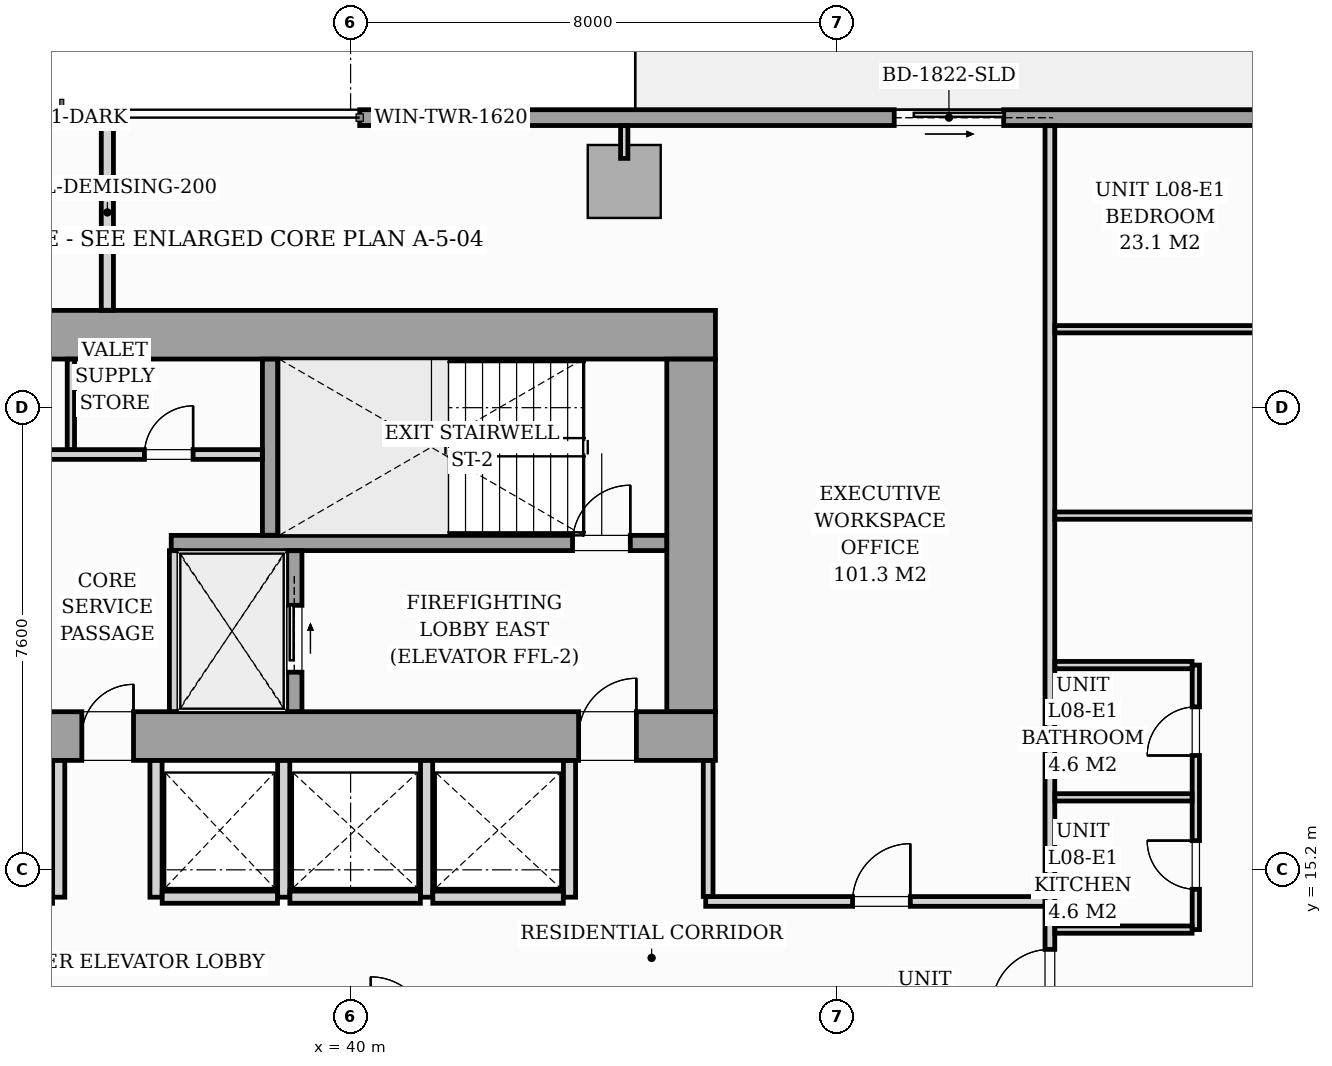
"""IFC4 building model, lengths in metres.
Left out: names, types, materials, properties, quantities, classifications, styles, units other than length and angle.
Written with IfcOpenShell. Run it as: python <this file> out.ifc"""

import sys

from ifc_helpers import new_model, si_unit, direction, frame, frame_2d, origin, origin_2d, place, context, subcontext, project, spatial, rectangle, i_section, extrude, source, transform, mapped, element, fill, save


model = new_model("IFC4")
c1 = context("Model", 3, precision=1e-05, world=origin(), true_north=direction((0.0, 1.0)))
c2 = subcontext(c1, "Body", "Model", "MODEL_VIEW")
j1 = project(units=[si_unit("LENGTHUNIT", "METRE"), si_unit("PLANEANGLEUNIT", "RADIAN")], contexts=[c1])
p1 = place(None, origin())
s1 = spatial("IfcSite", under=j1, at=p1, CompositionType="ELEMENT")
p2 = place(p1, origin())
s2 = spatial("IfcBuilding", under=s1, at=p2, CompositionType="ELEMENT")
p3 = place(p2, frame((0.0, 0.0, 32.6)))
s3 = spatial("IfcBuildingStorey", under=s2, at=p3, CompositionType="ELEMENT", Elevation=32.6)
m1 = source(origin(), c2, "Body", "SweptSolid", [
    extrude(i_section(OverallWidth=0.437, OverallDepth=0.514, WebThickness=0.061, FlangeThickness=0.097, FilletRadius=0.018, at=origin_2d()), origin(), (0.0, 0.0, 1.0), 3.196),
])
for number, where, z_axis, x_axis in (
    (1, (38.88, 17.4, 0.002), (0.0, 0.0, 1.0), (1.0, 0.0, 0.0)),
    (2, (45.6, 17.4, 0.002), (0.0, 0.0, 1.0), (1.0, 0.0, 0.0)),
    (3, (38.88, 24.0, 0.002), (0.0, 0.0, 1.0), (1.0, 0.0, 0.0)),
    (4, (45.6, 24.0, 0.002), (0.0, 0.0, 1.0), (1.0, 0.0, 0.0)),
):
    element("IfcColumn", number, at=place(p3, frame(where, z_axis=z_axis, x_axis=x_axis)), inside=s3, PredefinedType="PILASTER", context=c2, shape_type="MappedRepresentation", body=[
        mapped(m1, transform((0.0, 0.0, 0.0), scale=1.0)),
    ])
m2 = source(origin(), c2, "Body", "SweptSolid", [
    extrude(rectangle(XDim=1.2, YDim=1.2, at=origin_2d()), origin(), (0.0, 0.0, 1.0), 3.196),
])
p4 = place(p3, frame((44.5, 26.52, 0.002), z_axis=(0.0, 0.0, 1.0), x_axis=(1.0, 0.0, 0.0)))
e5 = element("IfcColumn", 5, at=p4, inside=s3, PredefinedType="COLUMN", context=c2, shape_type="MappedRepresentation", body=[
    mapped(m2, transform((0.0, 0.0, 0.0), scale=1.0)),
])
p5 = place(p3, frame((40.15, 27.57, 0.0), z_axis=(0.0, 0.0, 1.0), x_axis=(1.0, 0.0, 0.0)))
e6 = element("IfcWall", 6, at=p5, inside=s3, PredefinedType="STANDARD", context=c2, shape_type="SweptSolid", body=[
    extrude(rectangle(XDim=17.15, YDim=0.26, at=frame_2d((8.575, 0.0))), origin(), (0.0, 0.0, 1.0), 2.94),
])
p6 = place(p5, frame((8.79, 0.0, 0.0)))
e7 = element("IfcOpeningElement", 7, at=p6, cuts=e6, PredefinedType="OPENING", context=c2, shape_type="SweptSolid", body=[
    extrude(rectangle(XDim=1.8, YDim=2.06, at=frame_2d((0.9, 1.03))), frame((0.0, 0.14, 0.0), z_axis=(0.0, -1.0, 0.0), x_axis=(1.0, 0.0, 0.0)), (0.0, 0.0, 1.0), 0.28),
])
p7 = place(p5, frame((0.7, 0.0, 0.65)))
e8 = element("IfcOpeningElement", 8, at=p7, cuts=e6, PredefinedType="OPENING", context=c2, shape_type="SweptSolid", body=[
    extrude(rectangle(XDim=1.6, YDim=1.5, at=frame_2d((0.8, 0.75))), frame((0.0, 0.14, 0.0), z_axis=(0.0, -1.0, 0.0), x_axis=(1.0, 0.0, 0.0)), (0.0, 0.0, 1.0), 0.28),
])
p8 = place(p3, frame((26.0, 17.4, 0.0), z_axis=(0.0, 0.0, 1.0), x_axis=(1.0, 0.0, 0.0)))
e9 = element("IfcWall", 9, at=p8, inside=s3, PredefinedType="SHEAR", context=c2, shape_type="SweptSolid", body=[
    extrude(rectangle(XDim=20.0, YDim=0.8, at=frame_2d((10.0, 0.0))), origin(), (0.0, 0.0, 1.0), 3.2),
])
p9 = place(p8, frame((1.15, 0.0, 0.0)))
e10 = element("IfcOpeningElement", 10, at=p9, cuts=e9, PredefinedType="OPENING", context=c2, shape_type="SweptSolid", body=[
    extrude(rectangle(XDim=0.95, YDim=2.06, at=frame_2d((0.475, 1.03))), frame((0.0, 0.41, 0.0), z_axis=(0.0, -1.0, 0.0), x_axis=(1.0, 0.0, 0.0)), (0.0, 0.0, 1.0), 0.82),
])
p10 = place(p8, frame((9.58, 0.0, 0.0)))
e11 = element("IfcOpeningElement", 11, at=p10, cuts=e9, PredefinedType="OPENING", context=c2, shape_type="SweptSolid", body=[
    extrude(rectangle(XDim=0.85, YDim=2.0, at=frame_2d((0.425, 1.0))), frame((0.0, 0.41, 0.0), z_axis=(0.0, -1.0, 0.0), x_axis=(1.0, 0.0, 0.0)), (0.0, 0.0, 1.0), 0.82),
])
p11 = place(p8, frame((17.75, 0.0, 0.0)))
e12 = element("IfcOpeningElement", 12, at=p11, cuts=e9, PredefinedType="OPENING", context=c2, shape_type="SweptSolid", body=[
    extrude(rectangle(XDim=0.95, YDim=2.06, at=frame_2d((0.475, 1.03))), frame((0.0, 0.41, 0.0), z_axis=(0.0, -1.0, 0.0), x_axis=(1.0, 0.0, 0.0)), (0.0, 0.0, 1.0), 0.82),
])
p12 = place(p3, frame((26.0, 24.0, 0.0), z_axis=(0.0, 0.0, 1.0), x_axis=(1.0, 0.0, 0.0)))
e13 = element("IfcWall", 13, at=p12, inside=s3, PredefinedType="SHEAR", context=c2, shape_type="SweptSolid", body=[
    extrude(rectangle(XDim=20.0, YDim=0.8, at=frame_2d((10.0, 0.0))), origin(), (0.0, 0.0, 1.0), 3.2),
])
p13 = place(p3, frame((45.6, 17.802, 0.0), z_axis=(0.0, 0.0, 1.0), x_axis=(0.0, 1.0, 0.0)))
e14 = element("IfcWall", 14, at=p13, inside=s3, PredefinedType="SHEAR", context=c2, shape_type="SweptSolid", body=[
    extrude(rectangle(XDim=5.796, YDim=0.8, at=frame_2d((2.898, 0.0))), origin(), (0.0, 0.0, 1.0), 3.2),
])
p14 = place(p3, frame((37.05, 20.575, 0.0), z_axis=(0.0, 0.0, 1.0), x_axis=(1.0, 0.0, 0.0)))
e15 = element("IfcWall", 15, at=p14, inside=s3, PredefinedType="SOLIDWALL", context=c2, shape_type="SweptSolid", body=[
    extrude(rectangle(XDim=8.148, YDim=0.25, at=frame_2d((4.074, 0.0))), origin(), (0.0, 0.0, 1.0), 3.2),
])
p15 = place(p14, frame((6.6, 0.0, 0.0)))
e16 = element("IfcOpeningElement", 16, at=p15, cuts=e15, PredefinedType="OPENING", context=c2, shape_type="SweptSolid", body=[
    extrude(rectangle(XDim=0.95, YDim=2.06, at=frame_2d((0.475, 1.03))), frame((0.0, 0.135, 0.0), z_axis=(0.0, -1.0, 0.0), x_axis=(1.0, 0.0, 0.0)), (0.0, 0.0, 1.0), 0.27),
])
p16 = place(p3, frame((38.675, 20.702, 0.0), z_axis=(0.0, 0.0, 1.0), x_axis=(0.0, 1.0, 0.0)))
e17 = element("IfcWall", 17, at=p16, inside=s3, PredefinedType="SOLIDWALL", context=c2, shape_type="SweptSolid", body=[
    extrude(rectangle(XDim=2.896, YDim=0.25, at=frame_2d((1.448, 0.0))), origin(), (0.0, 0.0, 1.0), 3.2),
])
p17 = place(p3, frame((37.1, 17.802, 0.0), z_axis=(0.0, 0.0, 1.0), x_axis=(0.0, 1.0, 0.0)))
e18 = element("IfcWall", 18, at=p17, inside=s3, PredefinedType="PARTITIONING", context=c2, shape_type="SweptSolid", body=[
    extrude(rectangle(XDim=2.646, YDim=0.16, at=frame_2d((1.323, 0.0))), origin(), (0.0, 0.0, 1.0), 2.94),
])
p18 = place(p3, frame((39.075, 17.802, 0.0), z_axis=(0.0, 0.0, 1.0), x_axis=(0.0, 1.0, 0.0)))
e19 = element("IfcWall", 19, at=p18, inside=s3, PredefinedType="SOLIDWALL", context=c2, shape_type="SweptSolid", body=[
    extrude(rectangle(XDim=2.646, YDim=0.25, at=frame_2d((1.323, 0.0))), origin(), (0.0, 0.0, 1.0), 3.2),
])
p19 = place(p18, frame((0.648, 0.0, 0.0)))
e20 = element("IfcOpeningElement", 20, at=p19, cuts=e19, PredefinedType="OPENING", context=c2, shape_type="SweptSolid", body=[
    extrude(rectangle(XDim=1.1, YDim=2.08, at=frame_2d((0.55, 1.04))), frame((0.0, 0.135, 0.0), z_axis=(0.0, -1.0, 0.0), x_axis=(1.0, 0.0, 0.0)), (0.0, 0.0, 1.0), 0.27),
])
p20 = place(p3, frame((33.452, 22.03, 0.0), z_axis=(0.0, 0.0, 1.0), x_axis=(1.0, 0.0, 0.0)))
e21 = element("IfcWall", 21, at=p20, inside=s3, PredefinedType="PARTITIONING", context=c2, shape_type="SweptSolid", body=[
    extrude(rectangle(XDim=5.096, YDim=0.16, at=frame_2d((2.548, 0.0))), origin(), (0.0, 0.0, 1.0), 2.94),
])
p21 = place(p20, frame((0.538, 0.0, 0.0)))
e22 = element("IfcOpeningElement", 22, at=p21, cuts=e21, PredefinedType="OPENING", context=c2, shape_type="SweptSolid", body=[
    extrude(rectangle(XDim=0.8, YDim=2.05, at=frame_2d((0.4, 1.025))), frame((0.0, 0.09, 0.0), z_axis=(0.0, -1.0, 0.0), x_axis=(1.0, 0.0, 0.0)), (0.0, 0.0, 1.0), 0.18),
])
p22 = place(p20, frame((3.158, 0.0, 0.0)))
e23 = element("IfcOpeningElement", 23, at=p22, cuts=e21, PredefinedType="OPENING", context=c2, shape_type="SweptSolid", body=[
    extrude(rectangle(XDim=0.8, YDim=2.05, at=frame_2d((0.4, 1.025))), frame((0.0, 0.09, 0.0), z_axis=(0.0, -1.0, 0.0), x_axis=(1.0, 0.0, 0.0)), (0.0, 0.0, 1.0), 0.18),
])
p23 = place(p3, frame((35.4, 22.112, 0.0), z_axis=(0.0, 0.0, 1.0), x_axis=(0.0, 1.0, 0.0)))
e24 = element("IfcWall", 24, at=p23, inside=s3, PredefinedType="PARTITIONING", context=c2, shape_type="SweptSolid", body=[
    extrude(rectangle(XDim=1.486, YDim=0.12, at=frame_2d((0.743, 0.0))), origin(), (0.0, 0.0, 1.0), 2.94),
])
for number, where, z_axis, x_axis in (
    (25, (35.2, 14.75, 0.0), (0.0, 0.0, 1.0), (0.0, 1.0, 0.0)),
    (26, (36.8, 14.75, 0.0), (0.0, 0.0, 1.0), (0.0, 1.0, 0.0)),
    (27, (38.9, 14.75, 0.0), (0.0, 0.0, 1.0), (0.0, 1.0, 0.0)),
):
    element("IfcWall", number, at=place(p3, frame(where, z_axis=z_axis, x_axis=x_axis)), inside=s3, PredefinedType="PARTITIONING", context=c2, shape_type="SweptSolid", body=[
        extrude(rectangle(XDim=2.248, YDim=0.2, at=frame_2d((1.124, 0.0))), origin(), (0.0, 0.0, 1.0), 2.94),
    ])
p24 = place(p3, frame((36.902, 14.75, 0.0), z_axis=(0.0, 0.0, 1.0), x_axis=(1.0, 0.0, 0.0)))
e28 = element("IfcWall", 28, at=p24, inside=s3, PredefinedType="PARTITIONING", context=c2, shape_type="SweptSolid", body=[
    extrude(rectangle(XDim=1.896, YDim=0.2, at=frame_2d((0.948, 0.0))), origin(), (0.0, 0.0, 1.0), 2.94),
])
for number, where, z_axis, x_axis in (
    (29, (41.25, 14.75, 0.0), (0.0, 0.0, 1.0), (0.0, 1.0, 0.0)),
    (30, (43.6, 14.75, 0.0), (0.0, 0.0, 1.0), (0.0, 1.0, 0.0)),
):
    element("IfcWall", number, at=place(p3, frame(where, z_axis=z_axis, x_axis=x_axis)), inside=s3, PredefinedType="PARTITIONING", context=c2, shape_type="SweptSolid", body=[
        extrude(rectangle(XDim=2.248, YDim=0.2, at=frame_2d((1.124, 0.0))), origin(), (0.0, 0.0, 1.0), 2.94),
    ])
for number, where, z_axis, x_axis in (
    (31, (39.002, 14.75, 0.0), (0.0, 0.0, 1.0), (1.0, 0.0, 0.0)),
    (32, (41.352, 14.75, 0.0), (0.0, 0.0, 1.0), (1.0, 0.0, 0.0)),
):
    element("IfcWall", number, at=place(p3, frame(where, z_axis=z_axis, x_axis=x_axis)), inside=s3, PredefinedType="PARTITIONING", context=c2, shape_type="SweptSolid", body=[
        extrude(rectangle(XDim=2.146, YDim=0.2, at=frame_2d((1.073, 0.0))), origin(), (0.0, 0.0, 1.0), 2.94),
    ])
p25 = place(p3, frame((51.5, 12.572, 0.0), z_axis=(0.0, 0.0, 1.0), x_axis=(0.0, 1.0, 0.0)))
e33 = element("IfcWall", 33, at=p25, inside=s3, PredefinedType="PARTITIONING", context=c2, shape_type="SweptSolid", body=[
    extrude(rectangle(XDim=14.866, YDim=0.16, at=frame_2d((7.433, 0.0))), origin(), (0.0, 0.0, 1.0), 2.94),
])
p26 = place(p25, frame((0.37, 0.0, 0.0)))
e34 = element("IfcOpeningElement", 34, at=p26, cuts=e33, PredefinedType="OPENING", context=c2, shape_type="SweptSolid", body=[
    extrude(rectangle(XDim=0.95, YDim=2.06, at=frame_2d((0.475, 1.03))), frame((0.0, 0.09, 0.0), z_axis=(0.0, -1.0, 0.0), x_axis=(1.0, 0.0, 0.0)), (0.0, 0.0, 1.0), 0.18),
])
p27 = place(p3, frame((36.0, 24.402, 0.0), z_axis=(0.0, 0.0, 1.0), x_axis=(0.0, 1.0, 0.0)))
e35 = element("IfcWall", 35, at=p27, inside=s3, PredefinedType="PARTITIONING", context=c2, shape_type="SweptSolid", body=[
    extrude(rectangle(XDim=3.218, YDim=0.2, at=frame_2d((1.609, 0.0))), origin(), (0.0, 0.0, 1.0), 2.94),
])
p28 = place(p3, frame((53.9, 14.217, 0.0), z_axis=(0.0, 0.0, 1.0), x_axis=(0.0, 1.0, 0.0)))
e36 = element("IfcWall", 36, at=p28, inside=s3, PredefinedType="PARTITIONING", context=c2, shape_type="SweptSolid", body=[
    extrude(rectangle(XDim=4.35, YDim=0.12, at=frame_2d((2.175, 0.0))), origin(), (0.0, 0.0, 1.0), 2.94),
])
p29 = place(p28, frame((0.663, 0.0, 0.0)))
e37 = element("IfcOpeningElement", 37, at=p29, cuts=e36, PredefinedType="OPENING", context=c2, shape_type="SweptSolid", body=[
    extrude(rectangle(XDim=0.8, YDim=2.0, at=frame_2d((0.4, 1.0))), frame((0.0, 0.07, 0.0), z_axis=(0.0, -1.0, 0.0), x_axis=(1.0, 0.0, 0.0)), (0.0, 0.0, 1.0), 0.14),
])
p30 = place(p28, frame((2.863, 0.0, 0.0)))
e38 = element("IfcOpeningElement", 38, at=p30, cuts=e36, PredefinedType="OPENING", context=c2, shape_type="SweptSolid", body=[
    extrude(rectangle(XDim=0.8, YDim=2.02, at=frame_2d((0.4, 1.01))), frame((0.0, 0.07, 0.0), z_axis=(0.0, -1.0, 0.0), x_axis=(1.0, 0.0, 0.0)), (0.0, 0.0, 1.0), 0.14),
])
p31 = place(p3, frame((51.582, 16.392, 0.0), z_axis=(0.0, 0.0, 1.0), x_axis=(1.0, 0.0, 0.0)))
e39 = element("IfcWall", 39, at=p31, inside=s3, PredefinedType="PARTITIONING", context=c2, shape_type="SweptSolid", body=[
    extrude(rectangle(XDim=2.256, YDim=0.12, at=frame_2d((1.128, 0.0))), origin(), (0.0, 0.0, 1.0), 2.045),
])
for number, where, z_axis, x_axis in (
    (40, (51.582, 14.217, 0.0), (0.0, 0.0, 1.0), (1.0, 0.0, 0.0)),
    (41, (51.582, 18.567, 0.0), (0.0, 0.0, 1.0), (1.0, 0.0, 0.0)),
):
    element("IfcWall", number, at=place(p3, frame(where, z_axis=z_axis, x_axis=x_axis)), inside=s3, PredefinedType="PARTITIONING", context=c2, shape_type="SweptSolid", body=[
        extrude(rectangle(XDim=2.256, YDim=0.12, at=frame_2d((1.128, 0.0))), origin(), (0.0, 0.0, 1.0), 2.94),
    ])
p32 = place(p3, frame((51.582, 24.09, 0.0), z_axis=(0.0, 0.0, 1.0), x_axis=(1.0, 0.0, 0.0)))
e42 = element("IfcWall", 42, at=p32, inside=s3, PredefinedType="PARTITIONING", context=c2, shape_type="SweptSolid", body=[
    extrude(rectangle(XDim=8.138, YDim=0.12, at=frame_2d((4.069, 0.0))), origin(), (0.0, 0.0, 1.0), 2.94),
])
p33 = place(p32, frame((3.653, 0.0, 0.0)))
e43 = element("IfcOpeningElement", 43, at=p33, cuts=e42, PredefinedType="OPENING", context=c2, shape_type="SweptSolid", body=[
    extrude(rectangle(XDim=0.85, YDim=2.05, at=frame_2d((0.425, 1.025))), frame((0.0, 0.07, 0.0), z_axis=(0.0, -1.0, 0.0), x_axis=(1.0, 0.0, 0.0)), (0.0, 0.0, 1.0), 0.14),
])
p34 = place(p3, frame((51.582, 21.025, 0.0), z_axis=(0.0, 0.0, 1.0), x_axis=(1.0, 0.0, 0.0)))
e44 = element("IfcWall", 44, at=p34, inside=s3, PredefinedType="PARTITIONING", context=c2, shape_type="SweptSolid", body=[
    extrude(rectangle(XDim=8.138, YDim=0.12, at=frame_2d((4.069, 0.0))), origin(), (0.0, 0.0, 1.0), 2.94),
])
p35 = place(p34, frame((3.653, 0.0, 0.0)))
e45 = element("IfcOpeningElement", 45, at=p35, cuts=e44, PredefinedType="OPENING", context=c2, shape_type="SweptSolid", body=[
    extrude(rectangle(XDim=0.85, YDim=2.05, at=frame_2d((0.425, 1.025))), frame((0.0, 0.07, 0.0), z_axis=(0.0, -1.0, 0.0), x_axis=(1.0, 0.0, 0.0)), (0.0, 0.0, 1.0), 0.14),
])
p36 = place(p3, frame((45.84, 14.68, 0.0), z_axis=(0.0, 0.0, 1.0), x_axis=(1.0, 0.0, 0.0)))
e46 = element("IfcWall", 46, at=p36, inside=s3, PredefinedType="PARTITIONING", context=c2, shape_type="SweptSolid", body=[
    extrude(rectangle(XDim=5.578, YDim=0.16, at=frame_2d((2.789, 0.0))), origin(), (0.0, 0.0, 1.0), 2.94),
])
p37 = place(p36, frame((2.415, 0.0, 0.0)))
e47 = element("IfcOpeningElement", 47, at=p37, cuts=e46, PredefinedType="OPENING", context=c2, shape_type="SweptSolid", body=[
    extrude(rectangle(XDim=0.95, YDim=2.06, at=frame_2d((0.475, 1.03))), frame((0.0, 0.09, 0.0), z_axis=(0.0, -1.0, 0.0), x_axis=(1.0, 0.0, 0.0)), (0.0, 0.0, 1.0), 0.18),
])
p38 = place(p3, frame((45.88, 14.762, 0.0), z_axis=(0.0, 0.0, 1.0), x_axis=(0.0, 1.0, 0.0)))
e48 = element("IfcWall", 48, at=p38, inside=s3, PredefinedType="PARTITIONING", context=c2, shape_type="SweptSolid", body=[
    extrude(rectangle(XDim=2.236, YDim=0.16, at=frame_2d((1.118, 0.0))), origin(), (0.0, 0.0, 1.0), 2.94),
])
p39 = place(p3, frame((44.5, 26.9, 0.0), z_axis=(0.0, 0.0, 1.0), x_axis=(0.0, 1.0, 0.0)))
e49 = element("IfcWall", 49, at=p39, inside=s3, PredefinedType="PARTITIONING", context=c2, shape_type="SweptSolid", body=[
    extrude(rectangle(XDim=0.538, YDim=0.12, at=frame_2d((0.269, 0.0))), origin(), (0.0, 0.0, 1.0), 2.94),
])
m3 = source(origin(), c2, "Body", "SweptSolid", [
    extrude(rectangle(XDim=1.8, YDim=2.06, at=frame_2d((0.9, 1.03))), frame((0.0, 0.025, 0.0), z_axis=(0.0, -1.0, 0.0), x_axis=(1.0, 0.0, 0.0)), (0.0, 0.0, 1.0), 0.05),
])
p40 = place(p6, origin())
e50 = element("IfcDoor", 50, at=p40, inside=s3, OperationType="SLIDING_TO_RIGHT", PredefinedType="DOOR", context=c2, shape_type="MappedRepresentation", body=[
    mapped(m3, transform((0.0, 0.0, 0.0), scale=1.0)),
])
fill(e7, e50)
m4 = source(origin(), c2, "Body", "SweptSolid", [
    extrude(rectangle(XDim=1.6, YDim=1.5, at=frame_2d((0.8, 0.75))), frame((0.0, 0.03, 0.0), z_axis=(0.0, -1.0, 0.0), x_axis=(1.0, 0.0, 0.0)), (0.0, 0.0, 1.0), 0.06),
])
p41 = place(p7, origin())
e51 = element("IfcWindow", 51, at=p41, inside=s3, PartitioningType="SINGLE_PANEL", PredefinedType="WINDOW", context=c2, shape_type="MappedRepresentation", body=[
    mapped(m4, transform((0.0, 0.0, 0.0), scale=1.0)),
])
fill(e8, e51)
m5 = source(origin(), c2, "Body", "SweptSolid", [
    extrude(rectangle(XDim=0.85, YDim=2.0, at=frame_2d((0.425, 1.0))), frame((0.0, 0.025, 0.0), z_axis=(0.0, -1.0, 0.0), x_axis=(1.0, 0.0, 0.0)), (0.0, 0.0, 1.0), 0.05),
])
p42 = place(p10, origin())
e52 = element("IfcDoor", 52, at=p42, inside=s3, OperationType="SINGLE_SWING_RIGHT", PredefinedType="DOOR", context=c2, shape_type="MappedRepresentation", body=[
    mapped(m5, transform((0.0, 0.0, 0.0), scale=1.0)),
])
fill(e11, e52)
m6 = source(origin(), c2, "Body", "SweptSolid", [
    extrude(rectangle(XDim=0.95, YDim=2.06, at=frame_2d((0.475, 1.03))), frame((0.0, 0.025, 0.0), z_axis=(0.0, -1.0, 0.0), x_axis=(1.0, 0.0, 0.0)), (0.0, 0.0, 1.0), 0.05),
])
p43 = place(p11, origin())
e53 = element("IfcDoor", 53, at=p43, inside=s3, OperationType="SINGLE_SWING_RIGHT", PredefinedType="DOOR", context=c2, shape_type="MappedRepresentation", body=[
    mapped(m6, transform((0.0, 0.0, 0.0), scale=1.0)),
])
fill(e12, e53)
p44 = place(p15, origin())
e54 = element("IfcDoor", 54, at=p44, inside=s3, OperationType="SINGLE_SWING_RIGHT", PredefinedType="DOOR", context=c2, shape_type="MappedRepresentation", body=[
    mapped(m6, transform((0.0, 0.0, 0.0), scale=1.0)),
])
fill(e16, e54)
m7 = source(origin(), c2, "Body", "SweptSolid", [
    extrude(rectangle(XDim=1.1, YDim=2.08, at=frame_2d((0.55, 1.04))), frame((0.0, 0.025, 0.0), z_axis=(0.0, -1.0, 0.0), x_axis=(1.0, 0.0, 0.0)), (0.0, 0.0, 1.0), 0.05),
])
p45 = place(p19, origin())
e55 = element("IfcDoor", 55, at=p45, inside=s3, OperationType="SLIDING_TO_RIGHT", PredefinedType="DOOR", context=c2, shape_type="MappedRepresentation", body=[
    mapped(m7, transform((0.0, 0.0, 0.0), scale=1.0)),
])
fill(e20, e55)
m8 = source(origin(), c2, "Body", "SweptSolid", [
    extrude(rectangle(XDim=0.8, YDim=2.05, at=frame_2d((0.4, 1.025))), frame((0.0, 0.025, 0.0), z_axis=(0.0, -1.0, 0.0), x_axis=(1.0, 0.0, 0.0)), (0.0, 0.0, 1.0), 0.05),
])
p46 = place(p22, origin())
e56 = element("IfcDoor", 56, at=p46, inside=s3, OperationType="SINGLE_SWING_RIGHT", PredefinedType="DOOR", context=c2, shape_type="MappedRepresentation", body=[
    mapped(m8, transform((0.0, 0.0, 0.0), scale=1.0)),
])
fill(e23, e56)
m9 = source(origin(), c2, "Body", "SweptSolid", [
    extrude(rectangle(XDim=0.95, YDim=2.06, at=frame_2d((0.475, 1.03))), frame((0.0, 0.025, 0.0), z_axis=(0.0, -1.0, 0.0), x_axis=(1.0, 0.0, 0.0)), (0.0, 0.0, 1.0), 0.05),
])
p47 = place(p26, origin())
e57 = element("IfcDoor", 57, at=p47, inside=s3, OperationType="SINGLE_SWING_LEFT", PredefinedType="DOOR", context=c2, shape_type="MappedRepresentation", body=[
    mapped(m9, transform((0.0, 0.0, 0.0), scale=1.0)),
])
fill(e34, e57)
m10 = source(origin(), c2, "Body", "SweptSolid", [
    extrude(rectangle(XDim=0.8, YDim=2.0, at=frame_2d((0.4, 1.0))), frame((0.0, 0.025, 0.0), z_axis=(0.0, -1.0, 0.0), x_axis=(1.0, 0.0, 0.0)), (0.0, 0.0, 1.0), 0.05),
])
p48 = place(p29, origin())
e58 = element("IfcDoor", 58, at=p48, inside=s3, OperationType="SINGLE_SWING_RIGHT", PredefinedType="DOOR", context=c2, shape_type="MappedRepresentation", body=[
    mapped(m10, transform((0.0, 0.0, 0.0), scale=1.0)),
])
fill(e37, e58)
m11 = source(origin(), c2, "Body", "SweptSolid", [
    extrude(rectangle(XDim=0.8, YDim=2.02, at=frame_2d((0.4, 1.01))), frame((0.0, 0.025, 0.0), z_axis=(0.0, -1.0, 0.0), x_axis=(1.0, 0.0, 0.0)), (0.0, 0.0, 1.0), 0.05),
])
p49 = place(p30, origin())
e59 = element("IfcDoor", 59, at=p49, inside=s3, OperationType="SINGLE_SWING_LEFT", PredefinedType="DOOR", context=c2, shape_type="MappedRepresentation", body=[
    mapped(m11, transform((0.0, 0.0, 0.0), scale=1.0)),
])
fill(e38, e59)
p50 = place(p37, origin())
e60 = element("IfcDoor", 60, at=p50, inside=s3, OperationType="SINGLE_SWING_RIGHT", PredefinedType="DOOR", context=c2, shape_type="MappedRepresentation", body=[
    mapped(m9, transform((0.0, 0.0, 0.0), scale=1.0)),
])
fill(e47, e60)
save(model, sys.argv[1])
